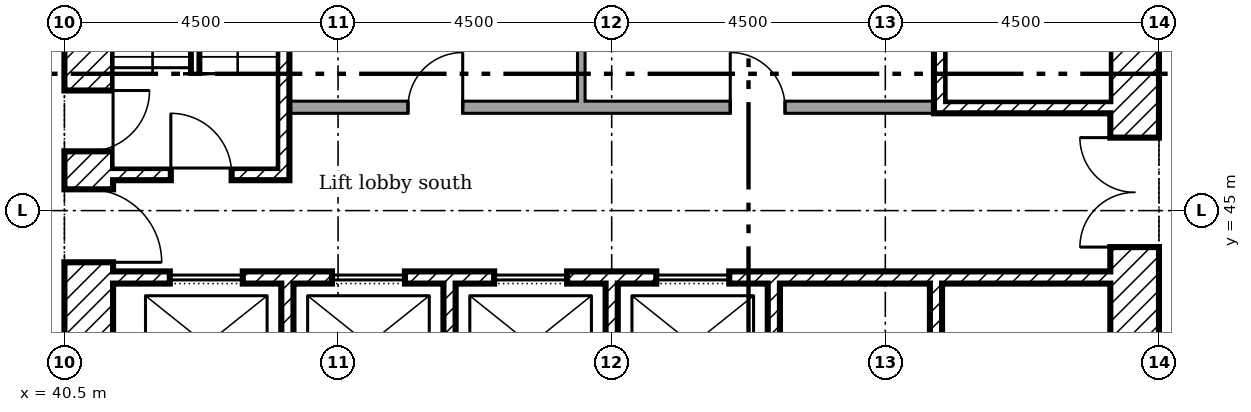
"""IFC4 building model, lengths in metres.
Left out: names, types, materials, properties, quantities, classifications, styles, units other than length and angle.
Written with IfcOpenShell. Run it as: python <this file> out.ifc"""

import sys

from ifc_helpers import new_model, si_unit, direction, frame, frame_2d, origin, place, context, subcontext, project, spatial, rectangle, extrude, element, fill, save


model = new_model("IFC4")
c1 = context("Model", 3, precision=1e-05, world=origin(), true_north=direction((0.0, 1.0)))
c2 = subcontext(c1, "Body", "Model", "MODEL_VIEW")
j1 = project(units=[si_unit("LENGTHUNIT", "METRE"), si_unit("PLANEANGLEUNIT", "RADIAN")], contexts=[c1])
p1 = place(None, origin())
s1 = spatial("IfcSite", under=j1, at=p1, CompositionType="ELEMENT")
p2 = place(p1, origin())
s2 = spatial("IfcBuilding", under=s1, at=p2, CompositionType="ELEMENT")
p3 = place(p2, frame((0.0, 0.0, 87.0)))
s3 = spatial("IfcBuildingStorey", under=s2, at=p3, CompositionType="ELEMENT", Elevation=87.0)
p4 = place(p3, frame((58.1, 40.5, 0.0), z_axis=(0.0, 0.0, 1.0), x_axis=(0.0, 1.0, 0.0)))
e1 = element("IfcWall", 1, at=p4, inside=s3, PredefinedType="SHEAR", context=c2, shape_type="SweptSolid", body=[
    extrude(rectangle(XDim=18.0, YDim=0.8, at=frame_2d((9.0, 0.0))), origin(), (0.0, 0.0, 1.0), 4.75),
])
p5 = place(p4, frame((13.15, 0.0, 0.0)))
e2 = element("IfcOpeningElement", 2, at=p5, cuts=e1, PredefinedType="OPENING", context=c2, shape_type="SweptSolid", body=[
    extrude(rectangle(XDim=1.2, YDim=2.1, at=frame_2d((0.6, 1.05))), frame((0.0, 0.41, 0.0), z_axis=(0.0, -1.0, 0.0), x_axis=(1.0, 0.0, 0.0)), (0.0, 0.0, 1.0), 0.82),
])
p6 = place(p4, frame((3.9, 0.0, 0.0)))
e3 = element("IfcOpeningElement", 3, at=p6, cuts=e1, PredefinedType="OPENING", context=c2, shape_type="SweptSolid", body=[
    extrude(rectangle(XDim=1.8, YDim=2.1, at=frame_2d((0.9, 1.05))), frame((0.0, 0.41, 0.0), z_axis=(0.0, -1.0, 0.0), x_axis=(1.0, 0.0, 0.0)), (0.0, 0.0, 1.0), 0.82),
])
p7 = place(p4, frame((11.525, 0.0, 0.0)))
e4 = element("IfcOpeningElement", 4, at=p7, cuts=e1, PredefinedType="OPENING", context=c2, shape_type="SweptSolid", body=[
    extrude(rectangle(XDim=1.0, YDim=2.1, at=frame_2d((0.5, 1.05))), frame((0.0, 0.41, 0.0), z_axis=(0.0, -1.0, 0.0), x_axis=(1.0, 0.0, 0.0)), (0.0, 0.0, 1.0), 0.82),
])
p8 = place(p3, frame((40.9, 40.5, 0.0), z_axis=(0.0, 0.0, 1.0), x_axis=(0.0, 1.0, 0.0)))
e5 = element("IfcWall", 5, at=p8, inside=s3, PredefinedType="SHEAR", context=c2, shape_type="SweptSolid", body=[
    extrude(rectangle(XDim=18.0, YDim=0.8, at=frame_2d((9.0, 0.0))), origin(), (0.0, 0.0, 1.0), 4.75),
])
p9 = place(p8, frame((3.65, 0.0, 0.0)))
e6 = element("IfcOpeningElement", 6, at=p9, cuts=e5, PredefinedType="OPENING", context=c2, shape_type="SweptSolid", body=[
    extrude(rectangle(XDim=1.2, YDim=2.1, at=frame_2d((0.6, 1.05))), frame((0.0, 0.41, 0.0), z_axis=(0.0, -1.0, 0.0), x_axis=(1.0, 0.0, 0.0)), (0.0, 0.0, 1.0), 0.82),
])
p10 = place(p8, frame((5.475, 0.0, 0.0)))
e7 = element("IfcOpeningElement", 7, at=p10, cuts=e5, PredefinedType="OPENING", context=c2, shape_type="SweptSolid", body=[
    extrude(rectangle(XDim=1.0, YDim=2.1, at=frame_2d((0.5, 1.05))), frame((0.0, 0.41, 0.0), z_axis=(0.0, -1.0, 0.0), x_axis=(1.0, 0.0, 0.0)), (0.0, 0.0, 1.0), 0.82),
])
p11 = place(p8, frame((12.3, 0.0, 0.0)))
e8 = element("IfcOpeningElement", 8, at=p11, cuts=e5, PredefinedType="OPENING", context=c2, shape_type="SweptSolid", body=[
    extrude(rectangle(XDim=1.0, YDim=2.1, at=frame_2d((0.5, 1.05))), frame((0.0, 0.41, 0.0), z_axis=(0.0, -1.0, 0.0), x_axis=(1.0, 0.0, 0.0)), (0.0, 0.0, 1.0), 0.82),
])
for number, where, z_axis, x_axis in (
    (9, (44.167, 41.3, 0.0), (0.0, 0.0, 1.0), (0.0, 1.0, 0.0)),
    (10, (46.833, 41.3, 0.0), (0.0, 0.0, 1.0), (0.0, 1.0, 0.0)),
    (11, (49.5, 41.3, 0.0), (0.0, 0.0, 1.0), (0.0, 1.0, 0.0)),
    (12, (52.167, 41.3, 0.0), (0.0, 0.0, 1.0), (0.0, 1.0, 0.0)),
    (13, (54.833, 41.3, 0.0), (0.0, 0.0, 1.0), (0.0, 1.0, 0.0)),
):
    element("IfcWall", number, at=place(p3, frame(where, z_axis=z_axis, x_axis=x_axis)), inside=s3, PredefinedType="SHEAR", context=c2, shape_type="SweptSolid", body=[
        extrude(rectangle(XDim=2.5, YDim=0.2, at=frame_2d((1.25, 0.0))), origin(), (0.0, 0.0, 1.0), 4.75),
    ])
p12 = place(p3, frame((41.3, 43.9, 0.0)))
e14 = element("IfcWall", 14, at=p12, inside=s3, PredefinedType="SHEAR", context=c2, shape_type="SweptSolid", body=[
    extrude(rectangle(XDim=16.4, YDim=0.2, at=frame_2d((8.2, 0.0))), origin(), (0.0, 0.0, 1.0), 4.75),
])
p13 = place(p12, frame((0.933, 0.0, 0.0)))
e15 = element("IfcOpeningElement", 15, at=p13, cuts=e14, PredefinedType="OPENING", context=c2, shape_type="SweptSolid", body=[
    extrude(rectangle(XDim=1.2, YDim=2.1, at=frame_2d((0.6, 1.05))), frame((0.0, 0.11, 0.0), z_axis=(0.0, -1.0, 0.0), x_axis=(1.0, 0.0, 0.0)), (0.0, 0.0, 1.0), 0.22),
])
p14 = place(p12, frame((3.6, 0.0, 0.0)))
e16 = element("IfcOpeningElement", 16, at=p14, cuts=e14, PredefinedType="OPENING", context=c2, shape_type="SweptSolid", body=[
    extrude(rectangle(XDim=1.2, YDim=2.1, at=frame_2d((0.6, 1.05))), frame((0.0, 0.11, 0.0), z_axis=(0.0, -1.0, 0.0), x_axis=(1.0, 0.0, 0.0)), (0.0, 0.0, 1.0), 0.22),
])
p15 = place(p12, frame((6.267, 0.0, 0.0)))
e17 = element("IfcOpeningElement", 17, at=p15, cuts=e14, PredefinedType="OPENING", context=c2, shape_type="SweptSolid", body=[
    extrude(rectangle(XDim=1.2, YDim=2.1, at=frame_2d((0.6, 1.05))), frame((0.0, 0.11, 0.0), z_axis=(0.0, -1.0, 0.0), x_axis=(1.0, 0.0, 0.0)), (0.0, 0.0, 1.0), 0.22),
])
p16 = place(p12, frame((8.933, 0.0, 0.0)))
e18 = element("IfcOpeningElement", 18, at=p16, cuts=e14, PredefinedType="OPENING", context=c2, shape_type="SweptSolid", body=[
    extrude(rectangle(XDim=1.2, YDim=2.1, at=frame_2d((0.6, 1.05))), frame((0.0, 0.11, 0.0), z_axis=(0.0, -1.0, 0.0), x_axis=(1.0, 0.0, 0.0)), (0.0, 0.0, 1.0), 0.22),
])
p17 = place(p3, frame((44.1, 45.5, 0.0), z_axis=(0.0, 0.0, 1.0), x_axis=(0.0, 1.0, 0.0)))
e19 = element("IfcWall", 19, at=p17, inside=s3, PredefinedType="SHEAR", context=c2, shape_type="SweptSolid", body=[
    extrude(rectangle(XDim=6.9, YDim=0.2, at=frame_2d((3.45, 0.0))), origin(), (0.0, 0.0, 1.0), 4.75),
])
p18 = place(p3, frame((41.3, 45.6, 0.0)))
e20 = element("IfcWall", 20, at=p18, inside=s3, PredefinedType="SHEAR", context=c2, shape_type="SweptSolid", body=[
    extrude(rectangle(XDim=2.7, YDim=0.2, at=frame_2d((1.35, 0.0))), origin(), (0.0, 0.0, 1.0), 4.75),
])
p19 = place(p18, frame((0.95, 0.0, 0.0)))
e21 = element("IfcOpeningElement", 21, at=p19, cuts=e20, PredefinedType="OPENING", context=c2, shape_type="SweptSolid", body=[
    extrude(rectangle(XDim=1.0, YDim=2.1, at=frame_2d((0.5, 1.05))), frame((0.0, 0.11, 0.0), z_axis=(0.0, -1.0, 0.0), x_axis=(1.0, 0.0, 0.0)), (0.0, 0.0, 1.0), 0.22),
])
p20 = place(p3, frame((54.8, 46.7, 0.0)))
e22 = element("IfcWall", 22, at=p20, inside=s3, PredefinedType="SHEAR", context=c2, shape_type="SweptSolid", body=[
    extrude(rectangle(XDim=2.9, YDim=0.2, at=frame_2d((1.45, 0.0))), origin(), (0.0, 0.0, 1.0), 4.75),
])
p21 = place(p3, frame((54.9, 46.8, 0.0), z_axis=(0.0, 0.0, 1.0), x_axis=(0.0, 1.0, 0.0)))
e23 = element("IfcWall", 23, at=p21, inside=s3, PredefinedType="SHEAR", context=c2, shape_type="SweptSolid", body=[
    extrude(rectangle(XDim=6.5, YDim=0.2, at=frame_2d((3.25, 0.0))), origin(), (0.0, 0.0, 1.0), 4.75),
])
p22 = place(p3, frame((44.2, 46.7, 0.0)))
e24 = element("IfcWall", 24, at=p22, inside=s3, PredefinedType="PARTITIONING", context=c2, shape_type="SweptSolid", body=[
    extrude(rectangle(XDim=10.6, YDim=0.2, at=frame_2d((5.3, 0.0))), origin(), (0.0, 0.0, 1.0), 4.75),
])
p23 = place(p22, frame((1.95, 0.0, 0.0)))
e25 = element("IfcOpeningElement", 25, at=p23, cuts=e24, PredefinedType="OPENING", context=c2, shape_type="SweptSolid", body=[
    extrude(rectangle(XDim=0.9, YDim=2.1, at=frame_2d((0.45, 1.05))), frame((0.0, 0.11, 0.0), z_axis=(0.0, -1.0, 0.0), x_axis=(1.0, 0.0, 0.0)), (0.0, 0.0, 1.0), 0.22),
])
p24 = place(p22, frame((7.25, 0.0, 0.0)))
e26 = element("IfcOpeningElement", 26, at=p24, cuts=e24, PredefinedType="OPENING", context=c2, shape_type="SweptSolid", body=[
    extrude(rectangle(XDim=0.9, YDim=2.1, at=frame_2d((0.45, 1.05))), frame((0.0, 0.11, 0.0), z_axis=(0.0, -1.0, 0.0), x_axis=(1.0, 0.0, 0.0)), (0.0, 0.0, 1.0), 0.22),
])
p25 = place(p3, frame((49.0, 46.8, 0.0), z_axis=(0.0, 0.0, 1.0), x_axis=(0.0, 1.0, 0.0)))
e27 = element("IfcWall", 27, at=p25, inside=s3, PredefinedType="PARTITIONING", context=c2, shape_type="SweptSolid", body=[
    extrude(rectangle(XDim=2.363, YDim=0.125, at=frame_2d((1.181, 0.0))), origin(), (0.0, 0.0, 1.0), 4.75),
])
p26 = place(p6, origin())
e28 = element("IfcDoor", 28, at=p26, inside=s3, OperationType="DOUBLE_DOOR_SINGLE_SWING", PredefinedType="DOOR", context=c2, shape_type="SweptSolid", body=[
    extrude(rectangle(XDim=1.8, YDim=2.1, at=frame_2d((0.9, 1.05))), frame((0.0, 0.025, 0.0), z_axis=(0.0, -1.0, 0.0), x_axis=(1.0, 0.0, 0.0)), (0.0, 0.0, 1.0), 0.05),
])
fill(e3, e28)
p27 = place(p9, frame((1.2, 0.0, 0.0), x_axis=(-1.0, 0.0, 0.0)))
e29 = element("IfcDoor", 29, at=p27, inside=s3, OperationType="SINGLE_SWING_LEFT", PredefinedType="DOOR", context=c2, shape_type="SweptSolid", body=[
    extrude(rectangle(XDim=1.2, YDim=2.1, at=frame_2d((0.6, 1.05))), frame((0.0, 0.025, 0.0), z_axis=(0.0, -1.0, 0.0), x_axis=(1.0, 0.0, 0.0)), (0.0, 0.0, 1.0), 0.05),
])
fill(e6, e29)
p28 = place(p19, origin())
e30 = element("IfcDoor", 30, at=p28, inside=s3, OperationType="SINGLE_SWING_RIGHT", PredefinedType="DOOR", context=c2, shape_type="SweptSolid", body=[
    extrude(rectangle(XDim=1.0, YDim=2.1, at=frame_2d((0.5, 1.05))), frame((0.0, 0.025, 0.0), z_axis=(0.0, -1.0, 0.0), x_axis=(1.0, 0.0, 0.0)), (0.0, 0.0, 1.0), 0.05),
])
fill(e21, e30)
p29 = place(p10, frame((1.0, 0.0, 0.0), x_axis=(-1.0, 0.0, 0.0)))
e31 = element("IfcDoor", 31, at=p29, inside=s3, OperationType="SINGLE_SWING_RIGHT", PredefinedType="DOOR", context=c2, shape_type="SweptSolid", body=[
    extrude(rectangle(XDim=1.0, YDim=2.1, at=frame_2d((0.5, 1.05))), frame((0.0, 0.025, 0.0), z_axis=(0.0, -1.0, 0.0), x_axis=(1.0, 0.0, 0.0)), (0.0, 0.0, 1.0), 0.05),
])
fill(e7, e31)
p30 = place(p23, origin())
e32 = element("IfcDoor", 32, at=p30, inside=s3, OperationType="SINGLE_SWING_LEFT", PredefinedType="DOOR", context=c2, shape_type="SweptSolid", body=[
    extrude(rectangle(XDim=0.9, YDim=2.1, at=frame_2d((0.45, 1.05))), frame((0.0, 0.025, 0.0), z_axis=(0.0, -1.0, 0.0), x_axis=(1.0, 0.0, 0.0)), (0.0, 0.0, 1.0), 0.05),
])
fill(e25, e32)
p31 = place(p24, origin())
e33 = element("IfcDoor", 33, at=p31, inside=s3, OperationType="SINGLE_SWING_RIGHT", PredefinedType="DOOR", context=c2, shape_type="SweptSolid", body=[
    extrude(rectangle(XDim=0.9, YDim=2.1, at=frame_2d((0.45, 1.05))), frame((0.0, 0.025, 0.0), z_axis=(0.0, -1.0, 0.0), x_axis=(1.0, 0.0, 0.0)), (0.0, 0.0, 1.0), 0.05),
])
fill(e26, e33)
p32 = place(p13, origin())
e34 = element("IfcDoor", 34, at=p32, inside=s3, OperationType="SLIDING_TO_LEFT", PredefinedType="DOOR", context=c2, shape_type="SweptSolid", body=[
    extrude(rectangle(XDim=1.2, YDim=2.1, at=frame_2d((0.6, 1.05))), frame((0.0, 0.025, 0.0), z_axis=(0.0, -1.0, 0.0), x_axis=(1.0, 0.0, 0.0)), (0.0, 0.0, 1.0), 0.05),
])
fill(e15, e34)
p33 = place(p14, origin())
e35 = element("IfcDoor", 35, at=p33, inside=s3, OperationType="SLIDING_TO_LEFT", PredefinedType="DOOR", context=c2, shape_type="SweptSolid", body=[
    extrude(rectangle(XDim=1.2, YDim=2.1, at=frame_2d((0.6, 1.05))), frame((0.0, 0.025, 0.0), z_axis=(0.0, -1.0, 0.0), x_axis=(1.0, 0.0, 0.0)), (0.0, 0.0, 1.0), 0.05),
])
fill(e16, e35)
p34 = place(p15, origin())
e36 = element("IfcDoor", 36, at=p34, inside=s3, OperationType="SLIDING_TO_LEFT", PredefinedType="DOOR", context=c2, shape_type="SweptSolid", body=[
    extrude(rectangle(XDim=1.2, YDim=2.1, at=frame_2d((0.6, 1.05))), frame((0.0, 0.025, 0.0), z_axis=(0.0, -1.0, 0.0), x_axis=(1.0, 0.0, 0.0)), (0.0, 0.0, 1.0), 0.05),
])
fill(e17, e36)
p35 = place(p16, origin())
e37 = element("IfcDoor", 37, at=p35, inside=s3, OperationType="SLIDING_TO_LEFT", PredefinedType="DOOR", context=c2, shape_type="SweptSolid", body=[
    extrude(rectangle(XDim=1.2, YDim=2.1, at=frame_2d((0.6, 1.05))), frame((0.0, 0.025, 0.0), z_axis=(0.0, -1.0, 0.0), x_axis=(1.0, 0.0, 0.0)), (0.0, 0.0, 1.0), 0.05),
])
fill(e18, e37)
save(model, sys.argv[1])
